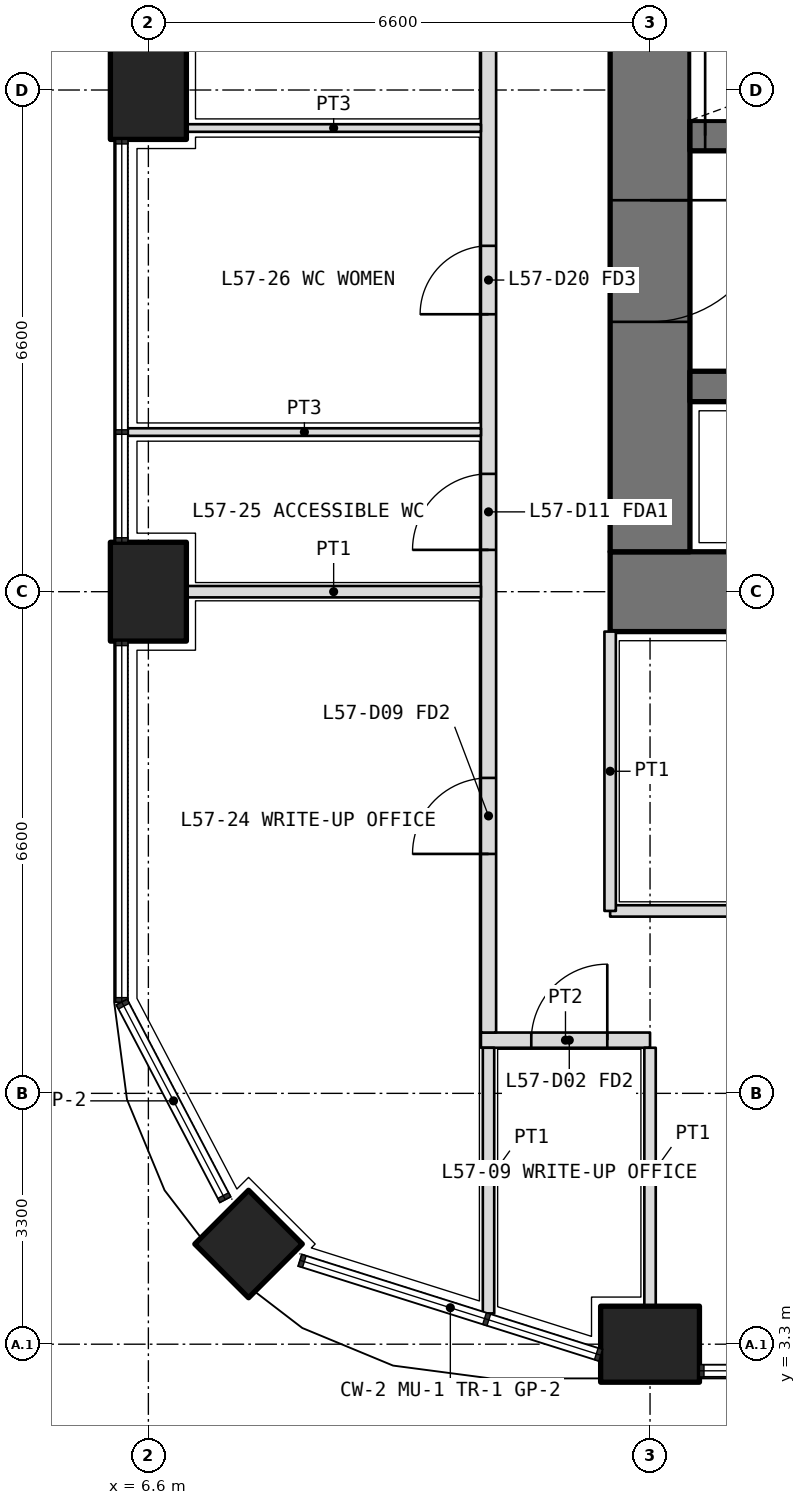
"""IFC4 building model, lengths in metres.
Left out: names, types, materials, properties, quantities, classifications, styles, units other than length and angle.
Written with IfcOpenShell. Run it as: python <this file> out.ifc"""

import sys

from ifc_helpers import new_model, si_unit, direction, frame, frame_2d, origin, origin_2d, place, context, subcontext, project, spatial, rectangle, extrude, element, fill, save


model = new_model("IFC4")
c1 = context("Model", 3, precision=1e-05, world=origin(), true_north=direction((0.0, 1.0)))
c2 = subcontext(c1, "Body", "Model", "MODEL_VIEW")
j1 = project(units=[si_unit("LENGTHUNIT", "METRE"), si_unit("PLANEANGLEUNIT", "RADIAN")], contexts=[c1])
p1 = place(None, origin())
s1 = spatial("IfcSite", under=j1, at=p1, CompositionType="ELEMENT")
p2 = place(p1, origin())
s2 = spatial("IfcBuilding", under=s1, at=p2, CompositionType="ELEMENT")
p3 = place(p2, frame((0.0, 0.0, 250.2)))
s3 = spatial("IfcBuildingStorey", under=s2, at=p3, CompositionType="ELEMENT", Elevation=250.2)
p4 = place(p3, frame((7.918, 4.618, 0.0), z_axis=(0.0, 0.0, 1.0), x_axis=(0.707106781187, 0.707106781187, 0.0)))
e1 = element("IfcColumn", 1, at=p4, inside=s3, PredefinedType="COLUMN", context=c2, shape_type="SweptSolid", body=[
    extrude(rectangle(XDim=1.0, YDim=1.0, at=origin_2d()), origin(), (0.0, 0.0, 1.0), 4.2),
])
for number, where, z_axis, x_axis in (
    (2, (13.2, 3.3, 0.0), (0.0, 0.0, 1.0), (1.0, 0.0, 0.0)),
    (3, (6.6, 13.2, 0.0), (0.0, 0.0, 1.0), (0.0, 1.0, 0.0)),
    (4, (6.6, 19.8, 0.0), (0.0, 0.0, 1.0), (0.0, 1.0, 0.0)),
):
    element("IfcColumn", number, at=place(p3, frame(where, z_axis=z_axis, x_axis=x_axis)), inside=s3, PredefinedType="COLUMN", context=c2, shape_type="SweptSolid", body=[
        extrude(rectangle(XDim=1.3, YDim=1.0, at=origin_2d()), origin(), (0.0, 0.0, 1.0), 4.2),
    ])
p5 = place(p3, frame((12.675, 13.2, 0.0), z_axis=(0.0, 0.0, 1.0), x_axis=(1.0, 0.0, 0.0)))
e5 = element("IfcWall", 5, at=p5, inside=s3, PredefinedType="SHEAR", context=c2, shape_type="SweptSolid", body=[
    extrude(rectangle(XDim=27.45, YDim=1.05, at=frame_2d((13.725, 0.0))), origin(), (0.0, 0.0, 1.0), 4.2),
])
p6 = place(p3, frame((13.2, 32.475, 0.0), z_axis=(0.0, 0.0, 1.0), x_axis=(0.0, -1.0, 0.0)))
e6 = element("IfcWall", 6, at=p6, inside=s3, PredefinedType="SHEAR", context=c2, shape_type="SweptSolid", body=[
    extrude(rectangle(XDim=18.75, YDim=1.05, at=frame_2d((9.375, 0.0))), origin(), (0.0, 0.0, 1.0), 4.2),
])
p7 = place(p6, frame((14.125, 0.0, 0.0)))
e7 = element("IfcOpeningElement", 7, at=p7, cuts=e6, PredefinedType="OPENING", context=c2, shape_type="SweptSolid", body=[
    extrude(rectangle(XDim=1.6, YDim=2.1, at=frame_2d((0.8, 1.05))), frame((0.0, 0.535, 0.0), z_axis=(0.0, -1.0, 0.0), x_axis=(1.0, 0.0, 0.0)), (0.0, 0.0, 1.0), 1.07),
])
p8 = place(p6, frame((3.325, 0.0, 0.0)))
e8 = element("IfcOpeningElement", 8, at=p8, cuts=e6, PredefinedType="OPENING", context=c2, shape_type="SweptSolid", body=[
    extrude(rectangle(XDim=1.6, YDim=2.1, at=frame_2d((0.8, 1.05))), frame((0.0, 0.535, 0.0), z_axis=(0.0, -1.0, 0.0), x_axis=(1.0, 0.0, 0.0)), (0.0, 0.0, 1.0), 1.07),
])
p9 = place(p3, frame((13.725, 15.9, 0.0), z_axis=(0.0, 0.0, 1.0), x_axis=(1.0, 0.0, 0.0)))
e9 = element("IfcWall", 9, at=p9, inside=s3, PredefinedType="SHEAR", context=c2, shape_type="SweptSolid", body=[
    extrude(rectangle(XDim=25.35, YDim=0.4, at=frame_2d((12.675, 0.0))), origin(), (0.0, 0.0, 1.0), 4.2),
])
p10 = place(p9, frame((0.837, 0.0, 0.0)))
e10 = element("IfcOpeningElement", 10, at=p10, cuts=e9, PredefinedType="OPENING", context=c2, shape_type="SweptSolid", body=[
    extrude(rectangle(XDim=1.0, YDim=2.1, at=frame_2d((0.5, 1.05))), frame((0.0, 0.21, 0.0), z_axis=(0.0, -1.0, 0.0), x_axis=(1.0, 0.0, 0.0)), (0.0, 0.0, 1.0), 0.42),
])
p11 = place(p9, frame((3.925, 0.0, 0.0)))
e11 = element("IfcOpeningElement", 11, at=p11, cuts=e9, PredefinedType="OPENING", context=c2, shape_type="SweptSolid", body=[
    extrude(rectangle(XDim=1.0, YDim=2.1, at=frame_2d((0.5, 1.05))), frame((0.0, 0.21, 0.0), z_axis=(0.0, -1.0, 0.0), x_axis=(1.0, 0.0, 0.0)), (0.0, 0.0, 1.0), 0.42),
])
p12 = place(p9, frame((7.225, 0.0, 0.0)))
e12 = element("IfcOpeningElement", 12, at=p12, cuts=e9, PredefinedType="OPENING", context=c2, shape_type="SweptSolid", body=[
    extrude(rectangle(XDim=1.0, YDim=2.1, at=frame_2d((0.5, 1.05))), frame((0.0, 0.21, 0.0), z_axis=(0.0, -1.0, 0.0), x_axis=(1.0, 0.0, 0.0)), (0.0, 0.0, 1.0), 0.42),
])
p13 = place(p9, frame((10.525, 0.0, 0.0)))
e13 = element("IfcOpeningElement", 13, at=p13, cuts=e9, PredefinedType="OPENING", context=c2, shape_type="SweptSolid", body=[
    extrude(rectangle(XDim=1.0, YDim=2.1, at=frame_2d((0.5, 1.05))), frame((0.0, 0.21, 0.0), z_axis=(0.0, -1.0, 0.0), x_axis=(1.0, 0.0, 0.0)), (0.0, 0.0, 1.0), 0.42),
])
p14 = place(p9, frame((13.825, 0.0, 0.0)))
e14 = element("IfcOpeningElement", 14, at=p14, cuts=e9, PredefinedType="OPENING", context=c2, shape_type="SweptSolid", body=[
    extrude(rectangle(XDim=1.0, YDim=2.1, at=frame_2d((0.5, 1.05))), frame((0.0, 0.21, 0.0), z_axis=(0.0, -1.0, 0.0), x_axis=(1.0, 0.0, 0.0)), (0.0, 0.0, 1.0), 0.42),
])
p15 = place(p9, frame((17.125, 0.0, 0.0)))
e15 = element("IfcOpeningElement", 15, at=p15, cuts=e9, PredefinedType="OPENING", context=c2, shape_type="SweptSolid", body=[
    extrude(rectangle(XDim=1.0, YDim=2.1, at=frame_2d((0.5, 1.05))), frame((0.0, 0.21, 0.0), z_axis=(0.0, -1.0, 0.0), x_axis=(1.0, 0.0, 0.0)), (0.0, 0.0, 1.0), 0.42),
])
p16 = place(p9, frame((20.425, 0.0, 0.0)))
e16 = element("IfcOpeningElement", 16, at=p16, cuts=e9, PredefinedType="OPENING", context=c2, shape_type="SweptSolid", body=[
    extrude(rectangle(XDim=1.0, YDim=2.1, at=frame_2d((0.5, 1.05))), frame((0.0, 0.21, 0.0), z_axis=(0.0, -1.0, 0.0), x_axis=(1.0, 0.0, 0.0)), (0.0, 0.0, 1.0), 0.42),
])
p17 = place(p9, frame((23.512, 0.0, 0.0)))
e17 = element("IfcOpeningElement", 17, at=p17, cuts=e9, PredefinedType="OPENING", context=c2, shape_type="SweptSolid", body=[
    extrude(rectangle(XDim=1.0, YDim=2.1, at=frame_2d((0.5, 1.05))), frame((0.0, 0.21, 0.0), z_axis=(0.0, -1.0, 0.0), x_axis=(1.0, 0.0, 0.0)), (0.0, 0.0, 1.0), 0.42),
])
p18 = place(p3, frame((13.725, 19.2, 0.0), z_axis=(0.0, 0.0, 1.0), x_axis=(1.0, 0.0, 0.0)))
e18 = element("IfcWall", 18, at=p18, inside=s3, PredefinedType="SHEAR", context=c2, shape_type="SweptSolid", body=[
    extrude(rectangle(XDim=25.35, YDim=0.4, at=frame_2d((12.675, 0.0))), origin(), (0.0, 0.0, 1.0), 4.2),
])
p19 = place(p18, frame((10.575, 0.0, 0.0)))
e19 = element("IfcOpeningElement", 19, at=p19, cuts=e18, PredefinedType="OPENING", context=c2, shape_type="SweptSolid", body=[
    extrude(rectangle(XDim=0.9, YDim=2.1, at=frame_2d((0.45, 1.05))), frame((0.0, 0.21, 0.0), z_axis=(0.0, -1.0, 0.0), x_axis=(1.0, 0.0, 0.0)), (0.0, 0.0, 1.0), 0.42),
])
p20 = place(p18, frame((13.875, 0.0, 0.0)))
e20 = element("IfcOpeningElement", 20, at=p20, cuts=e18, PredefinedType="OPENING", context=c2, shape_type="SweptSolid", body=[
    extrude(rectangle(XDim=0.9, YDim=2.1, at=frame_2d((0.45, 1.05))), frame((0.0, 0.21, 0.0), z_axis=(0.0, -1.0, 0.0), x_axis=(1.0, 0.0, 0.0)), (0.0, 0.0, 1.0), 0.42),
])
p21 = place(p18, frame((0.2, 0.0, 0.0)))
e21 = element("IfcOpeningElement", 21, at=p21, cuts=e18, PredefinedType="OPENING", context=c2, shape_type="SweptSolid", body=[
    extrude(rectangle(XDim=1.2, YDim=2.1, at=frame_2d((0.6, 1.05))), frame((0.0, 0.21, 0.0), z_axis=(0.0, -1.0, 0.0), x_axis=(1.0, 0.0, 0.0)), (0.0, 0.0, 1.0), 0.42),
])
p22 = place(p18, frame((23.512, 0.0, 0.0)))
e22 = element("IfcOpeningElement", 22, at=p22, cuts=e18, PredefinedType="OPENING", context=c2, shape_type="SweptSolid", body=[
    extrude(rectangle(XDim=1.1, YDim=2.1, at=frame_2d((0.55, 1.05))), frame((0.0, 0.21, 0.0), z_axis=(0.0, -1.0, 0.0), x_axis=(1.0, 0.0, 0.0)), (0.0, 0.0, 1.0), 0.42),
])
p23 = place(p18, frame((17.125, 0.0, 0.0)))
e23 = element("IfcOpeningElement", 23, at=p23, cuts=e18, PredefinedType="OPENING", context=c2, shape_type="SweptSolid", body=[
    extrude(rectangle(XDim=1.1, YDim=2.1, at=frame_2d((0.55, 1.05))), frame((0.0, 0.21, 0.0), z_axis=(0.0, -1.0, 0.0), x_axis=(1.0, 0.0, 0.0)), (0.0, 0.0, 1.0), 0.42),
])
p24 = place(p18, frame((20.325, 0.0, 0.0)))
e24 = element("IfcOpeningElement", 24, at=p24, cuts=e18, PredefinedType="OPENING", context=c2, shape_type="SweptSolid", body=[
    extrude(rectangle(XDim=1.1, YDim=2.1, at=frame_2d((0.55, 1.05))), frame((0.0, 0.21, 0.0), z_axis=(0.0, -1.0, 0.0), x_axis=(1.0, 0.0, 0.0)), (0.0, 0.0, 1.0), 0.42),
])
p25 = place(p3, frame((12.675, 9.0, 0.0), z_axis=(0.0, 0.0, 1.0), x_axis=(1.0, 0.0, 0.0)))
e25 = element("IfcWall", 25, at=p25, inside=s3, PredefinedType="PARTITIONING", context=c2, shape_type="SweptSolid", body=[
    extrude(rectangle(XDim=27.45, YDim=0.15, at=frame_2d((13.725, 0.0))), origin(), (0.0, 0.0, 1.0), 3.0),
])
p26 = place(p25, frame((3.062, 0.0, 0.0)))
e26 = element("IfcOpeningElement", 26, at=p26, cuts=e25, PredefinedType="OPENING", context=c2, shape_type="SweptSolid", body=[
    extrude(rectangle(XDim=1.0, YDim=2.1, at=frame_2d((0.5, 1.05))), frame((0.0, 0.085, 0.0), z_axis=(0.0, -1.0, 0.0), x_axis=(1.0, 0.0, 0.0)), (0.0, 0.0, 1.0), 0.17),
])
p27 = place(p25, frame((11.575, 0.0, 0.0)))
e27 = element("IfcOpeningElement", 27, at=p27, cuts=e25, PredefinedType="OPENING", context=c2, shape_type="SweptSolid", body=[
    extrude(rectangle(XDim=1.0, YDim=2.1, at=frame_2d((0.5, 1.05))), frame((0.0, 0.085, 0.0), z_axis=(0.0, -1.0, 0.0), x_axis=(1.0, 0.0, 0.0)), (0.0, 0.0, 1.0), 0.17),
])
p28 = place(p25, frame((19.825, 0.0, 0.0)))
e28 = element("IfcOpeningElement", 28, at=p28, cuts=e25, PredefinedType="OPENING", context=c2, shape_type="SweptSolid", body=[
    extrude(rectangle(XDim=1.0, YDim=2.1, at=frame_2d((0.5, 1.05))), frame((0.0, 0.085, 0.0), z_axis=(0.0, -1.0, 0.0), x_axis=(1.0, 0.0, 0.0)), (0.0, 0.0, 1.0), 0.17),
])
p29 = place(p25, frame((25.038, 0.0, 0.0)))
e29 = element("IfcOpeningElement", 29, at=p29, cuts=e25, PredefinedType="OPENING", context=c2, shape_type="SweptSolid", body=[
    extrude(rectangle(XDim=1.0, YDim=2.1, at=frame_2d((0.5, 1.05))), frame((0.0, 0.085, 0.0), z_axis=(0.0, -1.0, 0.0), x_axis=(1.0, 0.0, 0.0)), (0.0, 0.0, 1.0), 0.17),
])
p30 = place(p3, frame((12.675, 12.675, 0.0), z_axis=(0.0, 0.0, 1.0), x_axis=(0.0, -1.0, 0.0)))
e30 = element("IfcWall", 30, at=p30, inside=s3, PredefinedType="PARTITIONING", context=c2, shape_type="SweptSolid", body=[
    extrude(rectangle(XDim=3.675, YDim=0.15, at=frame_2d((1.837, 0.0))), origin(), (0.0, 0.0, 1.0), 3.0),
])
p31 = place(p3, frame((10.975, 7.3, 0.0), z_axis=(0.0, 0.0, 1.0), x_axis=(1.0, 0.0, 0.0)))
e31 = element("IfcWall", 31, at=p31, inside=s3, PredefinedType="PARTITIONING", context=c2, shape_type="SweptSolid", body=[
    extrude(rectangle(XDim=2.225, YDim=0.2, at=frame_2d((1.112, 0.0))), origin(), (0.0, 0.0, 1.0), 3.0),
])
p32 = place(p31, frame((0.663, 0.0, 0.0)))
e32 = element("IfcOpeningElement", 32, at=p32, cuts=e31, PredefinedType="OPENING", context=c2, shape_type="SweptSolid", body=[
    extrude(rectangle(XDim=1.0, YDim=2.1, at=frame_2d((0.5, 1.05))), frame((0.0, 0.11, 0.0), z_axis=(0.0, -1.0, 0.0), x_axis=(1.0, 0.0, 0.0)), (0.0, 0.0, 1.0), 0.22),
])
p33 = place(p3, frame((11.075, 7.4, 0.0), z_axis=(0.0, 0.0, 1.0), x_axis=(0.0, 1.0, 0.0)))
e33 = element("IfcWall", 33, at=p33, inside=s3, PredefinedType="PARTITIONING", context=c2, shape_type="SweptSolid", body=[
    extrude(rectangle(XDim=31.4, YDim=0.2, at=frame_2d((15.7, 0.0))), origin(), (0.0, 0.0, 1.0), 3.0),
])
p34 = place(p33, frame((2.35, 0.0, 0.0)))
e34 = element("IfcOpeningElement", 34, at=p34, cuts=e33, PredefinedType="OPENING", context=c2, shape_type="SweptSolid", body=[
    extrude(rectangle(XDim=1.0, YDim=2.1, at=frame_2d((0.5, 1.05))), frame((0.0, 0.11, 0.0), z_axis=(0.0, -1.0, 0.0), x_axis=(1.0, 0.0, 0.0)), (0.0, 0.0, 1.0), 0.22),
])
p35 = place(p33, frame((6.35, 0.0, 0.0)))
e35 = element("IfcOpeningElement", 35, at=p35, cuts=e33, PredefinedType="OPENING", context=c2, shape_type="SweptSolid", body=[
    extrude(rectangle(XDim=1.0, YDim=2.1, at=frame_2d((0.5, 1.05))), frame((0.0, 0.11, 0.0), z_axis=(0.0, -1.0, 0.0), x_axis=(1.0, 0.0, 0.0)), (0.0, 0.0, 1.0), 0.22),
])
p36 = place(p33, frame((9.45, 0.0, 0.0)))
e36 = element("IfcOpeningElement", 36, at=p36, cuts=e33, PredefinedType="OPENING", context=c2, shape_type="SweptSolid", body=[
    extrude(rectangle(XDim=0.9, YDim=2.1, at=frame_2d((0.45, 1.05))), frame((0.0, 0.11, 0.0), z_axis=(0.0, -1.0, 0.0), x_axis=(1.0, 0.0, 0.0)), (0.0, 0.0, 1.0), 0.22),
])
p37 = place(p33, frame((13.35, 0.0, 0.0)))
e37 = element("IfcOpeningElement", 37, at=p37, cuts=e33, PredefinedType="OPENING", context=c2, shape_type="SweptSolid", body=[
    extrude(rectangle(XDim=0.9, YDim=2.1, at=frame_2d((0.45, 1.05))), frame((0.0, 0.11, 0.0), z_axis=(0.0, -1.0, 0.0), x_axis=(1.0, 0.0, 0.0)), (0.0, 0.0, 1.0), 0.22),
])
p38 = place(p33, frame((16.85, 0.0, 0.0)))
e38 = element("IfcOpeningElement", 38, at=p38, cuts=e33, PredefinedType="OPENING", context=c2, shape_type="SweptSolid", body=[
    extrude(rectangle(XDim=1.0, YDim=2.1, at=frame_2d((0.5, 1.05))), frame((0.0, 0.11, 0.0), z_axis=(0.0, -1.0, 0.0), x_axis=(1.0, 0.0, 0.0)), (0.0, 0.0, 1.0), 0.22),
])
p39 = place(p33, frame((24.75, 0.0, 0.0)))
e39 = element("IfcOpeningElement", 39, at=p39, cuts=e33, PredefinedType="OPENING", context=c2, shape_type="SweptSolid", body=[
    extrude(rectangle(XDim=1.0, YDim=2.1, at=frame_2d((0.5, 1.05))), frame((0.0, 0.11, 0.0), z_axis=(0.0, -1.0, 0.0), x_axis=(1.0, 0.0, 0.0)), (0.0, 0.0, 1.0), 0.22),
])
p40 = place(p3, frame((11.075, 3.705, 0.0), z_axis=(0.0, 0.0, 1.0), x_axis=(0.0, 1.0, 0.0)))
e40 = element("IfcWall", 40, at=p40, inside=s3, PredefinedType="PARTITIONING", context=c2, shape_type="SweptSolid", body=[
    extrude(rectangle(XDim=3.495, YDim=0.15, at=frame_2d((1.748, 0.0))), origin(), (0.0, 0.0, 1.0), 2.7),
])
p41 = place(p3, frame((13.2, 3.8, 0.0), z_axis=(0.0, 0.0, 1.0), x_axis=(0.0, 1.0, 0.0)))
e41 = element("IfcWall", 41, at=p41, inside=s3, PredefinedType="PARTITIONING", context=c2, shape_type="SweptSolid", body=[
    extrude(rectangle(XDim=3.4, YDim=0.15, at=frame_2d((1.7, 0.0))), origin(), (0.0, 0.0, 1.0), 3.0),
])
p42 = place(p3, frame((6.33, 15.3, 0.0), z_axis=(0.0, 0.0, 1.0), x_axis=(1.0, 0.0, 0.0)))
e42 = element("IfcWall", 42, at=p42, inside=s3, PredefinedType="PARTITIONING", context=c2, shape_type="SweptSolid", body=[
    extrude(rectangle(XDim=4.645, YDim=0.1, at=frame_2d((2.323, 0.0))), origin(), (0.0, 0.0, 1.0), 2.7),
])
p43 = place(p3, frame((7.1, 19.3, 0.0), z_axis=(0.0, 0.0, 1.0), x_axis=(1.0, 0.0, 0.0)))
e43 = element("IfcWall", 43, at=p43, inside=s3, PredefinedType="PARTITIONING", context=c2, shape_type="SweptSolid", body=[
    extrude(rectangle(XDim=3.875, YDim=0.1, at=frame_2d((1.938, 0.0))), origin(), (0.0, 0.0, 1.0), 3.0),
])
p44 = place(p3, frame((7.1, 13.2, 0.0), z_axis=(0.0, 0.0, 1.0), x_axis=(1.0, 0.0, 0.0)))
e44 = element("IfcWall", 44, at=p44, inside=s3, PredefinedType="PARTITIONING", context=c2, shape_type="SweptSolid", body=[
    extrude(rectangle(XDim=3.875, YDim=0.15, at=frame_2d((1.938, 0.0))), origin(), (0.0, 0.0, 1.0), 3.0),
])
p45 = place(p32, origin())
e45 = element("IfcDoor", 45, at=p45, inside=s3, OperationType="SINGLE_SWING_RIGHT", PredefinedType="DOOR", context=c2, shape_type="SweptSolid", body=[
    extrude(rectangle(XDim=1.0, YDim=2.1, at=frame_2d((0.5, 1.05))), frame((0.0, 0.025, 0.0), z_axis=(0.0, -1.0, 0.0), x_axis=(1.0, 0.0, 0.0)), (0.0, 0.0, 1.0), 0.05),
])
fill(e32, e45)
p46 = place(p34, origin())
e46 = element("IfcDoor", 46, at=p46, inside=s3, OperationType="SINGLE_SWING_LEFT", PredefinedType="DOOR", context=c2, shape_type="SweptSolid", body=[
    extrude(rectangle(XDim=1.0, YDim=2.1, at=frame_2d((0.5, 1.05))), frame((0.0, 0.025, 0.0), z_axis=(0.0, -1.0, 0.0), x_axis=(1.0, 0.0, 0.0)), (0.0, 0.0, 1.0), 0.05),
])
fill(e34, e46)
p47 = place(p35, origin())
e47 = element("IfcDoor", 47, at=p47, inside=s3, OperationType="SINGLE_SWING_LEFT", PredefinedType="DOOR", context=c2, shape_type="SweptSolid", body=[
    extrude(rectangle(XDim=1.0, YDim=2.1, at=frame_2d((0.5, 1.05))), frame((0.0, 0.025, 0.0), z_axis=(0.0, -1.0, 0.0), x_axis=(1.0, 0.0, 0.0)), (0.0, 0.0, 1.0), 0.05),
])
fill(e35, e47)
p48 = place(p36, origin())
e48 = element("IfcDoor", 48, at=p48, inside=s3, OperationType="SINGLE_SWING_LEFT", PredefinedType="DOOR", context=c2, shape_type="SweptSolid", body=[
    extrude(rectangle(XDim=0.9, YDim=2.1, at=frame_2d((0.45, 1.05))), frame((0.0, 0.025, 0.0), z_axis=(0.0, -1.0, 0.0), x_axis=(1.0, 0.0, 0.0)), (0.0, 0.0, 1.0), 0.05),
])
fill(e36, e48)
p49 = place(p21, origin())
e49 = element("IfcDoor", 49, at=p49, inside=s3, OperationType="SINGLE_SWING_LEFT", PredefinedType="DOOR", context=c2, shape_type="SweptSolid", body=[
    extrude(rectangle(XDim=1.2, YDim=2.1, at=frame_2d((0.6, 1.05))), frame((0.0, 0.025, 0.0), z_axis=(0.0, -1.0, 0.0), x_axis=(1.0, 0.0, 0.0)), (0.0, 0.0, 1.0), 0.05),
])
fill(e21, e49)
p50 = place(p7, origin())
e50 = element("IfcDoor", 50, at=p50, inside=s3, OperationType="DOUBLE_DOOR_DOUBLE_SWING", PredefinedType="DOOR", context=c2, shape_type="SweptSolid", body=[
    extrude(rectangle(XDim=1.6, YDim=2.1, at=frame_2d((0.8, 1.05))), frame((0.0, 0.025, 0.0), z_axis=(0.0, -1.0, 0.0), x_axis=(1.0, 0.0, 0.0)), (0.0, 0.0, 1.0), 0.05),
])
fill(e7, e50)
save(model, sys.argv[1])
